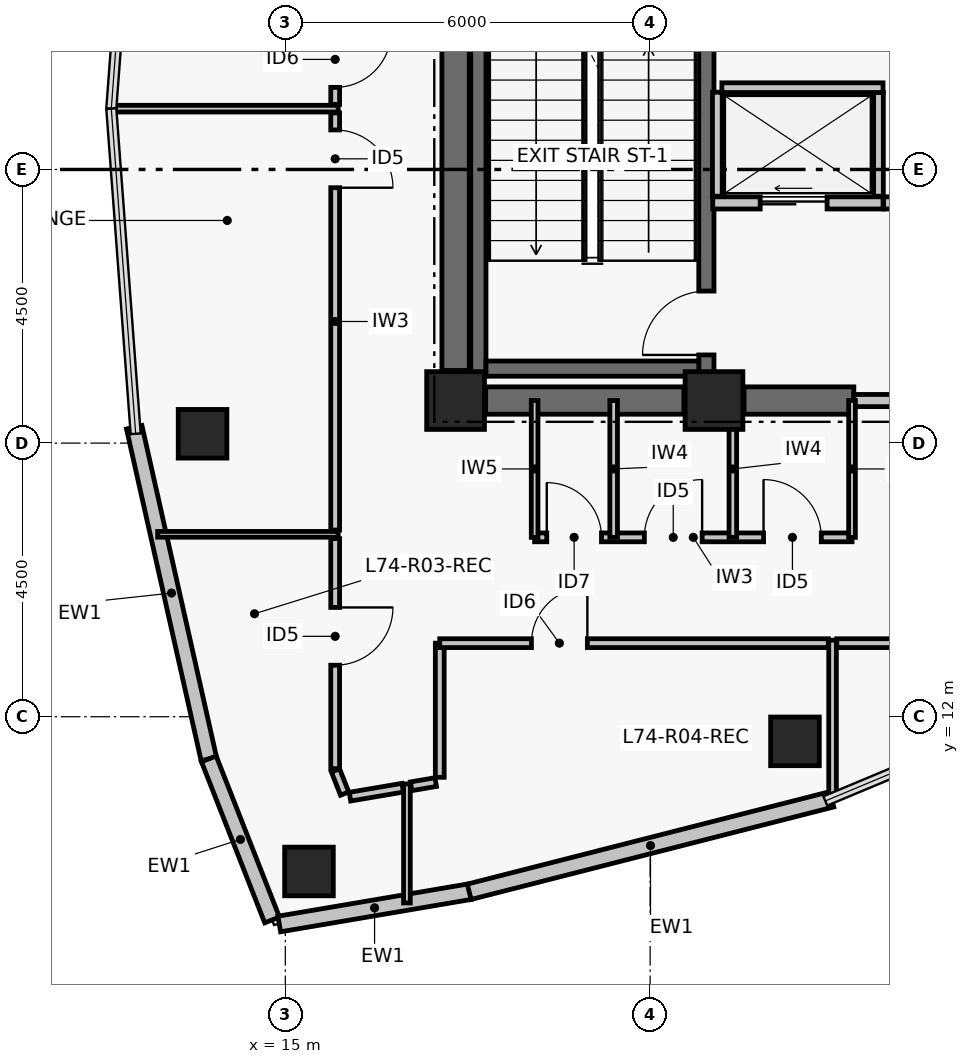
"""IFC4 building model, lengths in metres.
Left out: names, types, materials, properties, quantities, classifications, styles, units other than length and angle.
Written with IfcOpenShell. Run it as: python <this file> out.ifc"""

import sys

from ifc_helpers import new_model, si_unit, direction, frame, frame_2d, origin, origin_2d, place, context, subcontext, project, spatial, rectangle, hollow_rectangle, extrude, element, fill, save


model = new_model("IFC4")
c1 = context("Model", 3, precision=1e-05, world=origin(), true_north=direction((0.0, 1.0)))
c2 = subcontext(c1, "Body", "Model", "MODEL_VIEW")
j1 = project(units=[si_unit("LENGTHUNIT", "METRE"), si_unit("PLANEANGLEUNIT", "RADIAN")], contexts=[c1])
p1 = place(None, origin())
s1 = spatial("IfcSite", under=j1, at=p1, CompositionType="ELEMENT")
p2 = place(p1, origin())
s2 = spatial("IfcBuilding", under=s1, at=p2, CompositionType="ELEMENT")
p3 = place(p2, frame((0.0, 0.0, 291.78)))
s3 = spatial("IfcBuildingStorey", under=s2, at=p3, CompositionType="ELEMENT", Elevation=291.78)
for number, where, z_axis, x_axis in (
    (1, (17.8, 17.2, 0.0), (0.0, 0.0, 1.0), (1.0, 0.0, 0.0)),
    (2, (22.05, 17.2, 0.0), (0.0, 0.0, 1.0), (1.0, 0.0, 0.0)),
):
    element("IfcColumn", number, at=place(p3, frame(where, z_axis=z_axis, x_axis=x_axis)), inside=s3, PredefinedType="COLUMN", context=c2, shape_type="SweptSolid", body=[
        extrude(rectangle(XDim=0.95, YDim=0.95, at=origin_2d()), origin(), (0.0, 0.0, 1.0), 3.72),
    ])
p4 = place(p3, frame((18.295, 17.2, 0.0), z_axis=(0.0, 0.0, 1.0), x_axis=(1.0, 0.0, 0.0)))
e3 = element("IfcWall", 3, at=p4, inside=s3, PredefinedType="SHEAR", context=c2, shape_type="SweptSolid", body=[
    extrude(rectangle(XDim=3.26, YDim=0.45, at=frame_2d((1.63, 0.0))), origin(), (0.0, 0.0, 1.0), 3.5),
])
p5 = place(p3, frame((22.545, 17.2, 0.0), z_axis=(0.0, 0.0, 1.0), x_axis=(1.0, 0.0, 0.0)))
e4 = element("IfcWall", 4, at=p5, inside=s3, PredefinedType="SHEAR", context=c2, shape_type="SweptSolid", body=[
    extrude(rectangle(XDim=1.805, YDim=0.45, at=frame_2d((0.903, 0.0))), origin(), (0.0, 0.0, 1.0), 3.5),
])
p6 = place(p3, frame((17.8, 17.695, 0.0), z_axis=(0.0, 0.0, 1.0), x_axis=(0.0, 1.0, 0.0)))
e5 = element("IfcWall", 5, at=p6, inside=s3, PredefinedType="SHEAR", context=c2, shape_type="SweptSolid", body=[
    extrude(rectangle(XDim=8.61, YDim=0.45, at=frame_2d((4.305, 0.0))), origin(), (0.0, 0.0, 1.0), 3.5),
])
p7 = place(p3, frame((18.175, 17.6, 0.0), z_axis=(0.0, 0.0, 1.0), x_axis=(0.0, 1.0, 0.0)))
e6 = element("IfcWall", 6, at=p7, inside=s3, PredefinedType="SHEAR", context=c2, shape_type="SweptSolid", body=[
    extrude(rectangle(XDim=8.8, YDim=0.25, at=frame_2d((4.4, 0.0))), origin(), (0.0, 0.0, 1.0), 3.5),
])
p8 = place(p3, frame((21.925, 17.6, 0.0), z_axis=(0.0, 0.0, 1.0), x_axis=(0.0, 1.0, 0.0)))
e7 = element("IfcWall", 7, at=p8, inside=s3, PredefinedType="SHEAR", context=c2, shape_type="SweptSolid", body=[
    extrude(rectangle(XDim=8.8, YDim=0.25, at=frame_2d((4.4, 0.0))), origin(), (0.0, 0.0, 1.0), 3.5),
])
p9 = place(p8, frame((0.35, 0.0, 0.0)))
e8 = element("IfcOpeningElement", 8, at=p9, cuts=e7, PredefinedType="OPENING", context=c2, shape_type="SweptSolid", body=[
    extrude(rectangle(XDim=1.05, YDim=2.08, at=frame_2d((0.525, 1.04))), frame((0.0, 0.135, 0.0), z_axis=(0.0, -1.0, 0.0), x_axis=(1.0, 0.0, 0.0)), (0.0, 0.0, 1.0), 0.27),
])
p10 = place(p3, frame((18.3, 17.725, 0.0), z_axis=(0.0, 0.0, 1.0), x_axis=(1.0, 0.0, 0.0)))
e9 = element("IfcWall", 9, at=p10, inside=s3, PredefinedType="SHEAR", context=c2, shape_type="SweptSolid", body=[
    extrude(rectangle(XDim=3.5, YDim=0.25, at=frame_2d((1.75, 0.0))), origin(), (0.0, 0.0, 1.0), 3.5),
])
for number, where, z_axis, x_axis in (
    (10, (13.639, 16.653, 0.0), (0.0, 0.0, 1.0), (1.0, 0.0, 0.0)),
    (11, (15.389, 9.455, 0.0), (0.0, 0.0, 1.0), (1.0, 0.0, 0.0)),
    (12, (23.382, 11.595, 0.0), (0.0, 0.0, 1.0), (1.0, 0.0, 0.0)),
):
    element("IfcColumn", number, at=place(p3, frame(where, z_axis=z_axis, x_axis=x_axis)), inside=s3, PredefinedType="COLUMN", context=c2, shape_type="SweptSolid", body=[
        extrude(hollow_rectangle(XDim=0.8, YDim=0.8, WallThickness=0.035, at=origin_2d()), origin(), (0.0, 0.0, 1.0), 3.72),
    ])
p11 = place(p3, frame((13.742, 11.307, 0.0), z_axis=(0.0, 0.0, 1.0), x_axis=(-0.219500763731, 0.97561232809, 0.0)))
e13 = element("IfcWall", 13, at=p11, inside=s3, PredefinedType="PARTITIONING", context=c2, shape_type="SweptSolid", body=[
    extrude(rectangle(XDim=5.59, YDim=0.26, at=frame_2d((2.795, 0.0))), origin(), (0.0, 0.0, 1.0), 3.5),
])
p12 = place(p3, frame((14.782, 8.658, 0.0), z_axis=(0.0, 0.0, 1.0), x_axis=(-0.36559927932, 0.930772349697, 0.0)))
e14 = element("IfcWall", 14, at=p12, inside=s3, PredefinedType="PARTITIONING", context=c2, shape_type="SweptSolid", body=[
    extrude(rectangle(XDim=2.845, YDim=0.26, at=frame_2d((1.423, 0.0))), origin(), (0.0, 0.0, 1.0), 3.5),
])
p13 = place(p3, frame((18.036, 9.124, 0.0), z_axis=(0.0, 0.0, 1.0), x_axis=(-0.985889432766, -0.167397808709, 0.0)))
e15 = element("IfcWall", 15, at=p13, inside=s3, PredefinedType="PARTITIONING", context=c2, shape_type="SweptSolid", body=[
    extrude(rectangle(XDim=3.181, YDim=0.26, at=frame_2d((1.59, 0.0))), origin(), (0.0, 0.0, 1.0), 3.5),
])
p14 = place(p3, frame((23.988, 10.642, 0.0), z_axis=(0.0, 0.0, 1.0), x_axis=(-0.968988278672, -0.247106689096, 0.0)))
e16 = element("IfcWall", 16, at=p14, inside=s3, PredefinedType="PARTITIONING", context=c2, shape_type="SweptSolid", body=[
    extrude(rectangle(XDim=6.154, YDim=0.26, at=frame_2d((3.077, 0.0))), origin(), (0.0, 0.0, 1.0), 3.5),
])
p15 = place(p3, frame((24.35, 17.2, 0.0), z_axis=(0.0, 0.0, 1.0), x_axis=(1.0, 0.0, 0.0)))
e17 = element("IfcWall", 17, at=p15, inside=s3, PredefinedType="PARTITIONING", context=c2, shape_type="SweptSolid", body=[
    extrude(rectangle(XDim=2.5, YDim=0.2, at=frame_2d((1.25, 0.0))), origin(), (0.0, 0.0, 1.0), 2.63),
])
p16 = place(p15, frame((0.68, 0.0, 0.0)))
e18 = element("IfcOpeningElement", 18, at=p16, cuts=e17, PredefinedType="OPENING", context=c2, shape_type="SweptSolid", body=[
    extrude(rectangle(XDim=1.15, YDim=2.08, at=frame_2d((0.575, 1.04))), frame((0.0, 0.11, 0.0), z_axis=(0.0, -1.0, 0.0), x_axis=(1.0, 0.0, 0.0)), (0.0, 0.0, 1.0), 0.22),
])
p17 = place(p3, frame((24.84, 20.45, 0.0), z_axis=(0.0, 0.0, 1.0), x_axis=(1.0, 0.0, 0.0)))
e19 = element("IfcWall", 19, at=p17, inside=s3, PredefinedType="PARTITIONING", context=c2, shape_type="SweptSolid", body=[
    extrude(rectangle(XDim=1.52, YDim=0.2, at=frame_2d((0.76, 0.0))), origin(), (0.0, 0.0, 1.0), 3.5),
])
p18 = place(p17, frame((0.27, 0.0, 0.0)))
e20 = element("IfcOpeningElement", 20, at=p18, cuts=e19, PredefinedType="OPENING", context=c2, shape_type="SweptSolid", body=[
    extrude(rectangle(XDim=0.98, YDim=2.06, at=frame_2d((0.49, 1.03))), frame((0.0, 0.11, 0.0), z_axis=(0.0, -1.0, 0.0), x_axis=(1.0, 0.0, 0.0)), (0.0, 0.0, 1.0), 0.22),
])
p19 = place(p3, frame((22.03, 20.45, 0.0), z_axis=(0.0, 0.0, 1.0), x_axis=(1.0, 0.0, 0.0)))
e21 = element("IfcWall", 21, at=p19, inside=s3, PredefinedType="PARTITIONING", context=c2, shape_type="SweptSolid", body=[
    extrude(rectangle(XDim=2.8, YDim=0.2, at=frame_2d((1.4, 0.0))), origin(), (0.0, 0.0, 1.0), 3.5),
])
p20 = place(p19, frame((0.78, 0.0, 0.0)))
e22 = element("IfcOpeningElement", 22, at=p20, cuts=e21, PredefinedType="OPENING", context=c2, shape_type="SweptSolid", body=[
    extrude(rectangle(XDim=1.1, YDim=2.08, at=frame_2d((0.55, 1.04))), frame((0.0, 0.11, 0.0), z_axis=(0.0, -1.0, 0.0), x_axis=(1.0, 0.0, 0.0)), (0.0, 0.0, 1.0), 0.22),
])
for number, where, z_axis, x_axis in (
    (23, (22.105, 20.56, 0.0), (0.0, 0.0, 1.0), (0.0, 1.0, 0.0)),
    (24, (24.755, 20.56, 0.0), (0.0, 0.0, 1.0), (0.0, 1.0, 0.0)),
):
    element("IfcWall", number, at=place(p3, frame(where, z_axis=z_axis, x_axis=x_axis)), inside=s3, PredefinedType="PARTITIONING", context=c2, shape_type="SweptSolid", body=[
        extrude(rectangle(XDim=1.71, YDim=0.16, at=frame_2d((0.855, 0.0))), origin(), (0.0, 0.0, 1.0), 3.5),
    ])
p21 = place(p3, frame((22.18, 22.345, 0.0), z_axis=(0.0, 0.0, 1.0), x_axis=(1.0, 0.0, 0.0)))
e25 = element("IfcWall", 25, at=p21, inside=s3, PredefinedType="PARTITIONING", context=c2, shape_type="SweptSolid", body=[
    extrude(rectangle(XDim=2.65, YDim=0.16, at=frame_2d((1.325, 0.0))), origin(), (0.0, 0.0, 1.0), 3.5),
])
p22 = place(p3, frame((19.1, 14.95, 0.0), z_axis=(0.0, 0.0, 1.0), x_axis=(1.0, 0.0, 0.0)))
e26 = element("IfcWall", 26, at=p22, inside=s3, PredefinedType="PARTITIONING", context=c2, shape_type="SweptSolid", body=[
    extrude(rectangle(XDim=5.22, YDim=0.145, at=frame_2d((2.61, 0.0))), origin(), (0.0, 0.0, 1.0), 2.83),
])
p23 = place(p22, frame((0.2, 0.0, 0.0)))
e27 = element("IfcOpeningElement", 27, at=p23, cuts=e26, PredefinedType="OPENING", context=c2, shape_type="SweptSolid", body=[
    extrude(rectangle(XDim=0.9, YDim=2.02, at=frame_2d((0.45, 1.01))), frame((0.0, 0.083, 0.0), z_axis=(0.0, -1.0, 0.0), x_axis=(1.0, 0.0, 0.0)), (0.0, 0.0, 1.0), 0.165),
])
p24 = place(p22, frame((1.805, 0.0, 0.0)))
e28 = element("IfcOpeningElement", 28, at=p24, cuts=e26, PredefinedType="OPENING", context=c2, shape_type="SweptSolid", body=[
    extrude(rectangle(XDim=0.95, YDim=2.06, at=frame_2d((0.475, 1.03))), frame((0.0, 0.083, 0.0), z_axis=(0.0, -1.0, 0.0), x_axis=(1.0, 0.0, 0.0)), (0.0, 0.0, 1.0), 0.165),
])
p25 = place(p22, frame((3.765, 0.0, 0.0)))
e29 = element("IfcOpeningElement", 29, at=p25, cuts=e26, PredefinedType="OPENING", context=c2, shape_type="SweptSolid", body=[
    extrude(rectangle(XDim=0.95, YDim=2.06, at=frame_2d((0.475, 1.03))), frame((0.0, 0.083, 0.0), z_axis=(0.0, -1.0, 0.0), x_axis=(1.0, 0.0, 0.0)), (0.0, 0.0, 1.0), 0.165),
])
p26 = place(p3, frame((19.1, 14.95, 0.0), z_axis=(0.0, 0.0, 1.0), x_axis=(0.0, 1.0, 0.0)))
e30 = element("IfcWall", 30, at=p26, inside=s3, PredefinedType="PARTITIONING", context=c2, shape_type="SweptSolid", body=[
    extrude(rectangle(XDim=2.25, YDim=0.11, at=frame_2d((1.125, 0.0))), origin(), (0.0, 0.0, 1.0), 2.63),
])
for number, where, z_axis, x_axis in (
    (31, (20.4, 14.95, 0.0), (0.0, 0.0, 1.0), (0.0, 1.0, 0.0)),
    (32, (22.36, 14.95, 0.0), (0.0, 0.0, 1.0), (0.0, 1.0, 0.0)),
):
    element("IfcWall", number, at=place(p3, frame(where, z_axis=z_axis, x_axis=x_axis)), inside=s3, PredefinedType="PARTITIONING", context=c2, shape_type="SweptSolid", body=[
        extrude(rectangle(XDim=2.25, YDim=0.125, at=frame_2d((1.125, 0.0))), origin(), (0.0, 0.0, 1.0), 2.63),
    ])
p27 = place(p3, frame((24.32, 14.95, 0.0), z_axis=(0.0, 0.0, 1.0), x_axis=(0.0, 1.0, 0.0)))
e33 = element("IfcWall", 33, at=p27, inside=s3, PredefinedType="PARTITIONING", context=c2, shape_type="SweptSolid", body=[
    extrude(rectangle(XDim=2.25, YDim=0.11, at=frame_2d((1.125, 0.0))), origin(), (0.0, 0.0, 1.0), 2.63),
])
p28 = place(p3, frame((15.82, 21.93, 0.0), z_axis=(0.0, 0.0, 1.0), x_axis=(0.0, -1.0, 0.0)))
e34 = element("IfcWall", 34, at=p28, inside=s3, PredefinedType="PARTITIONING", context=c2, shape_type="SweptSolid", body=[
    extrude(rectangle(XDim=6.86, YDim=0.145, at=frame_2d((3.43, 0.0))), origin(), (0.0, 0.0, 1.0), 2.83),
])
p29 = place(p28, frame((0.28, 0.0, 0.0)))
e35 = element("IfcOpeningElement", 35, at=p29, cuts=e34, PredefinedType="OPENING", context=c2, shape_type="SweptSolid", body=[
    extrude(rectangle(XDim=0.95, YDim=2.06, at=frame_2d((0.475, 1.03))), frame((0.0, 0.083, 0.0), z_axis=(0.0, -1.0, 0.0), x_axis=(1.0, 0.0, 0.0)), (0.0, 0.0, 1.0), 0.165),
])
p30 = place(p3, frame((15.82, 14.93, 0.0), z_axis=(0.0, 0.0, 1.0), x_axis=(0.0, -1.0, 0.0)))
e36 = element("IfcWall", 36, at=p30, inside=s3, PredefinedType="PARTITIONING", context=c2, shape_type="SweptSolid", body=[
    extrude(rectangle(XDim=3.784, YDim=0.145, at=frame_2d((1.892, 0.0))), origin(), (0.0, 0.0, 1.0), 2.83),
])
p31 = place(p30, frame((1.133, 0.0, 0.0)))
e37 = element("IfcOpeningElement", 37, at=p31, cuts=e36, PredefinedType="OPENING", context=c2, shape_type="SweptSolid", body=[
    extrude(rectangle(XDim=0.95, YDim=2.06, at=frame_2d((0.475, 1.03))), frame((0.0, 0.083, 0.0), z_axis=(0.0, -1.0, 0.0), x_axis=(1.0, 0.0, 0.0)), (0.0, 0.0, 1.0), 0.165),
])
p32 = place(p3, frame((15.825, 11.117, 0.0), z_axis=(0.0, 0.0, 1.0), x_axis=(0.365633948196, -0.930758731319, 0.0)))
e38 = element("IfcWall", 38, at=p32, inside=s3, PredefinedType="PARTITIONING", context=c2, shape_type="SweptSolid", body=[
    extrude(rectangle(XDim=0.41, YDim=0.145, at=frame_2d((0.205, 0.0))), origin(), (0.0, 0.0, 1.0), 2.83),
])
p33 = place(p3, frame((16.063, 10.686, 0.0), z_axis=(0.0, 0.0, 1.0), x_axis=(0.985878779942, 0.167460536424, 0.0)))
e39 = element("IfcWall", 39, at=p33, inside=s3, PredefinedType="PARTITIONING", context=c2, shape_type="SweptSolid", body=[
    extrude(rectangle(XDim=0.879, YDim=0.145, at=frame_2d((0.439, 0.0))), origin(), (0.0, 0.0, 1.0), 3.13),
])
p34 = place(p3, frame((17.07, 10.856, 0.0), z_axis=(0.0, 0.0, 1.0), x_axis=(0.985840066474, 0.167688292179, 0.0)))
e40 = element("IfcWall", 40, at=p34, inside=s3, PredefinedType="PARTITIONING", context=c2, shape_type="SweptSolid", body=[
    extrude(rectangle(XDim=0.409, YDim=0.145, at=frame_2d((0.205, 0.0))), origin(), (0.0, 0.0, 1.0), 3.5),
])
p35 = place(p3, frame((17.54, 11.004, 0.0), z_axis=(0.0, 0.0, 1.0), x_axis=(0.0, 1.0, 0.0)))
e41 = element("IfcWall", 41, at=p35, inside=s3, PredefinedType="PARTITIONING", context=c2, shape_type="SweptSolid", body=[
    extrude(rectangle(XDim=2.206, YDim=0.145, at=frame_2d((1.103, 0.0))), origin(), (0.0, 0.0, 1.0), 3.13),
])
p36 = place(p3, frame((17.54, 13.21, 0.0), z_axis=(0.0, 0.0, 1.0), x_axis=(1.0, 0.0, 0.0)))
e42 = element("IfcWall", 42, at=p36, inside=s3, PredefinedType="PARTITIONING", context=c2, shape_type="SweptSolid", body=[
    extrude(rectangle(XDim=6.39, YDim=0.145, at=frame_2d((3.195, 0.0))), origin(), (0.0, 0.0, 1.0), 2.83),
])
p37 = place(p36, frame((1.508, 0.0, 0.0)))
e43 = element("IfcOpeningElement", 43, at=p37, cuts=e42, PredefinedType="OPENING", context=c2, shape_type="SweptSolid", body=[
    extrude(rectangle(XDim=0.92, YDim=2.05, at=frame_2d((0.46, 1.025))), frame((0.0, 0.083, 0.0), z_axis=(0.0, -1.0, 0.0), x_axis=(1.0, 0.0, 0.0)), (0.0, 0.0, 1.0), 0.165),
])
p38 = place(p3, frame((24.07, 13.21, 0.0), z_axis=(0.0, 0.0, 1.0), x_axis=(1.0, 0.0, 0.0)))
e44 = element("IfcWall", 44, at=p38, inside=s3, PredefinedType="PARTITIONING", context=c2, shape_type="SweptSolid", body=[
    extrude(rectangle(XDim=5.04, YDim=0.145, at=frame_2d((2.52, 0.0))), origin(), (0.0, 0.0, 1.0), 2.98),
])
p39 = place(p38, frame((2.927, 0.0, 0.0)))
e45 = element("IfcOpeningElement", 45, at=p39, cuts=e44, PredefinedType="OPENING", context=c2, shape_type="SweptSolid", body=[
    extrude(rectangle(XDim=0.95, YDim=2.06, at=frame_2d((0.475, 1.03))), frame((0.0, 0.083, 0.0), z_axis=(0.0, -1.0, 0.0), x_axis=(1.0, 0.0, 0.0)), (0.0, 0.0, 1.0), 0.165),
])
p40 = place(p3, frame((15.82, 28.93, 0.0), z_axis=(0.0, 0.0, 1.0), x_axis=(0.0, -1.0, 0.0)))
e46 = element("IfcWall", 46, at=p40, inside=s3, PredefinedType="PARTITIONING", context=c2, shape_type="SweptSolid", body=[
    extrude(rectangle(XDim=6.86, YDim=0.145, at=frame_2d((3.43, 0.0))), origin(), (0.0, 0.0, 1.0), 2.83),
])
p41 = place(p40, frame((5.66, 0.0, 0.0)))
e47 = element("IfcOpeningElement", 47, at=p41, cuts=e46, PredefinedType="OPENING", context=c2, shape_type="SweptSolid", body=[
    extrude(rectangle(XDim=0.92, YDim=2.05, at=frame_2d((0.46, 1.025))), frame((0.0, 0.083, 0.0), z_axis=(0.0, -1.0, 0.0), x_axis=(1.0, 0.0, 0.0)), (0.0, 0.0, 1.0), 0.165),
])
p42 = place(p3, frame((17.0, 8.938, 0.0), z_axis=(0.0, 0.0, 1.0), x_axis=(0.0, 1.0, 0.0)))
e48 = element("IfcWall", 48, at=p42, inside=s3, PredefinedType="PARTITIONING", context=c2, shape_type="SweptSolid", body=[
    extrude(rectangle(XDim=1.958, YDim=0.11, at=frame_2d((0.979, 0.0))), origin(), (0.0, 0.0, 1.0), 2.98),
])
p43 = place(p3, frame((24.0, 10.654, 0.0), z_axis=(0.0, 0.0, 1.0), x_axis=(0.0, 1.0, 0.0)))
e49 = element("IfcWall", 49, at=p43, inside=s3, PredefinedType="PARTITIONING", context=c2, shape_type="SweptSolid", body=[
    extrude(rectangle(XDim=2.606, YDim=0.125, at=frame_2d((1.303, 0.0))), origin(), (0.0, 0.0, 1.0), 2.98),
])
p44 = place(p3, frame((12.901, 15.0, 0.0), z_axis=(0.0, 0.0, 1.0), x_axis=(1.0, 0.0, 0.0)))
e50 = element("IfcWall", 50, at=p44, inside=s3, PredefinedType="PARTITIONING", context=c2, shape_type="SweptSolid", body=[
    extrude(rectangle(XDim=2.969, YDim=0.095, at=frame_2d((1.485, 0.0))), origin(), (0.0, 0.0, 1.0), 2.98),
])
p45 = place(p3, frame((12.128, 22.0, 0.0), z_axis=(0.0, 0.0, 1.0), x_axis=(1.0, 0.0, 0.0)))
e51 = element("IfcWall", 51, at=p45, inside=s3, PredefinedType="PARTITIONING", context=c2, shape_type="SweptSolid", body=[
    extrude(rectangle(XDim=3.742, YDim=0.11, at=frame_2d((1.871, 0.0))), origin(), (0.0, 0.0, 1.0), 2.98),
])
p46 = place(p9, origin())
e52 = element("IfcDoor", 52, at=p46, inside=s3, OperationType="SINGLE_SWING_LEFT", PredefinedType="DOOR", context=c2, shape_type="SweptSolid", body=[
    extrude(rectangle(XDim=1.05, YDim=2.08, at=frame_2d((0.525, 1.04))), frame((0.0, 0.025, 0.0), z_axis=(0.0, -1.0, 0.0), x_axis=(1.0, 0.0, 0.0)), (0.0, 0.0, 1.0), 0.05),
])
fill(e8, e52)
p47 = place(p20, origin())
e53 = element("IfcDoor", 53, at=p47, inside=s3, OperationType="DOUBLE_DOOR_SLIDING", PredefinedType="DOOR", context=c2, shape_type="SweptSolid", body=[
    extrude(rectangle(XDim=1.1, YDim=2.08, at=frame_2d((0.55, 1.04))), frame((0.0, 0.025, 0.0), z_axis=(0.0, -1.0, 0.0), x_axis=(1.0, 0.0, 0.0)), (0.0, 0.0, 1.0), 0.05),
])
fill(e22, e53)
p48 = place(p23, origin())
e54 = element("IfcDoor", 54, at=p48, inside=s3, OperationType="SINGLE_SWING_LEFT", PredefinedType="DOOR", context=c2, shape_type="SweptSolid", body=[
    extrude(rectangle(XDim=0.9, YDim=2.02, at=frame_2d((0.45, 1.01))), frame((0.0, 0.025, 0.0), z_axis=(0.0, -1.0, 0.0), x_axis=(1.0, 0.0, 0.0)), (0.0, 0.0, 1.0), 0.05),
])
fill(e27, e54)
p49 = place(p24, origin())
e55 = element("IfcDoor", 55, at=p49, inside=s3, OperationType="SINGLE_SWING_RIGHT", PredefinedType="DOOR", context=c2, shape_type="SweptSolid", body=[
    extrude(rectangle(XDim=0.95, YDim=2.06, at=frame_2d((0.475, 1.03))), frame((0.0, 0.025, 0.0), z_axis=(0.0, -1.0, 0.0), x_axis=(1.0, 0.0, 0.0)), (0.0, 0.0, 1.0), 0.05),
])
fill(e28, e55)
p50 = place(p25, origin())
e56 = element("IfcDoor", 56, at=p50, inside=s3, OperationType="SINGLE_SWING_LEFT", PredefinedType="DOOR", context=c2, shape_type="SweptSolid", body=[
    extrude(rectangle(XDim=0.95, YDim=2.06, at=frame_2d((0.475, 1.03))), frame((0.0, 0.025, 0.0), z_axis=(0.0, -1.0, 0.0), x_axis=(1.0, 0.0, 0.0)), (0.0, 0.0, 1.0), 0.05),
])
fill(e29, e56)
p51 = place(p29, origin())
e57 = element("IfcDoor", 57, at=p51, inside=s3, OperationType="SINGLE_SWING_RIGHT", PredefinedType="DOOR", context=c2, shape_type="SweptSolid", body=[
    extrude(rectangle(XDim=0.95, YDim=2.06, at=frame_2d((0.475, 1.03))), frame((0.0, 0.025, 0.0), z_axis=(0.0, -1.0, 0.0), x_axis=(1.0, 0.0, 0.0)), (0.0, 0.0, 1.0), 0.05),
])
fill(e35, e57)
p52 = place(p31, origin())
e58 = element("IfcDoor", 58, at=p52, inside=s3, OperationType="SINGLE_SWING_LEFT", PredefinedType="DOOR", context=c2, shape_type="SweptSolid", body=[
    extrude(rectangle(XDim=0.95, YDim=2.06, at=frame_2d((0.475, 1.03))), frame((0.0, 0.025, 0.0), z_axis=(0.0, -1.0, 0.0), x_axis=(1.0, 0.0, 0.0)), (0.0, 0.0, 1.0), 0.05),
])
fill(e37, e58)
p53 = place(p37, origin())
e59 = element("IfcDoor", 59, at=p53, inside=s3, OperationType="SINGLE_SWING_RIGHT", PredefinedType="DOOR", context=c2, shape_type="SweptSolid", body=[
    extrude(rectangle(XDim=0.92, YDim=2.05, at=frame_2d((0.46, 1.025))), frame((0.0, 0.025, 0.0), z_axis=(0.0, -1.0, 0.0), x_axis=(1.0, 0.0, 0.0)), (0.0, 0.0, 1.0), 0.05),
])
fill(e43, e59)
p54 = place(p41, origin())
e60 = element("IfcDoor", 60, at=p54, inside=s3, OperationType="SINGLE_SWING_LEFT", PredefinedType="DOOR", context=c2, shape_type="SweptSolid", body=[
    extrude(rectangle(XDim=0.92, YDim=2.05, at=frame_2d((0.46, 1.025))), frame((0.0, 0.025, 0.0), z_axis=(0.0, -1.0, 0.0), x_axis=(1.0, 0.0, 0.0)), (0.0, 0.0, 1.0), 0.05),
])
fill(e47, e60)
save(model, sys.argv[1])
